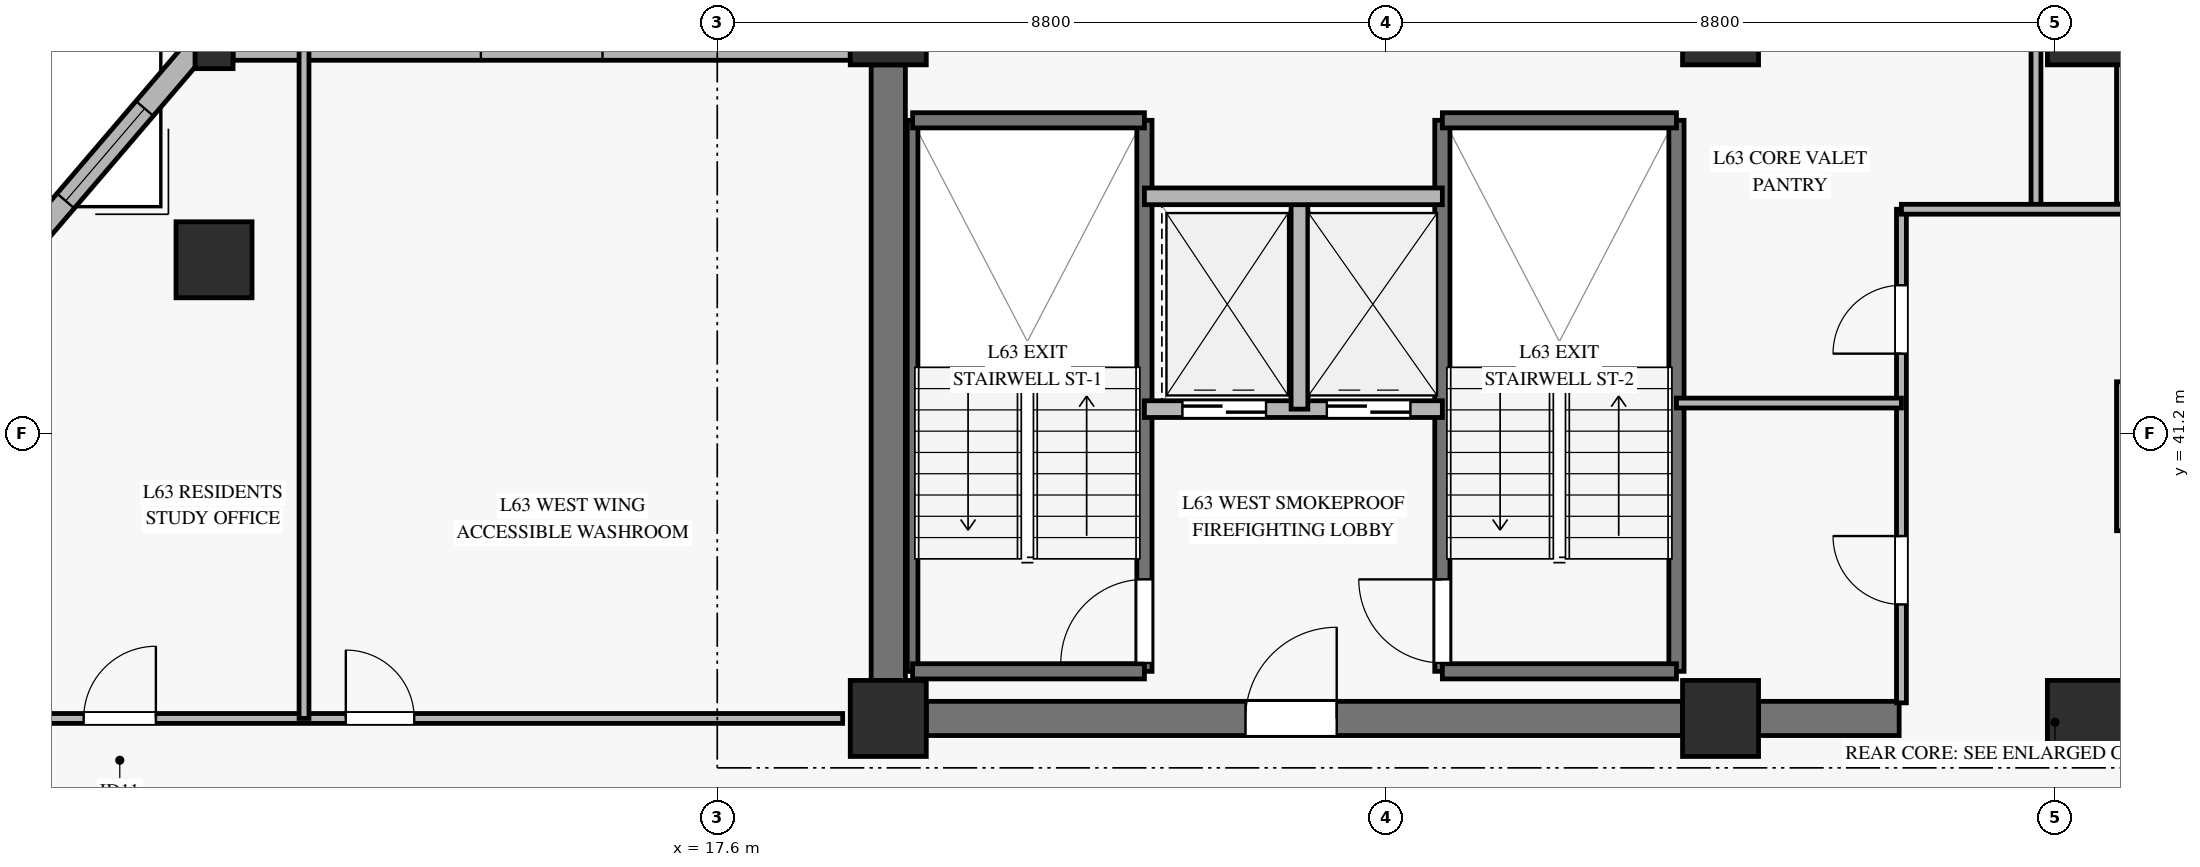
"""IFC4 building model, lengths in metres.
Left out: names, types, materials, properties, quantities, classifications, styles, units other than length and angle.
Written with IfcOpenShell. Run it as: python <this file> out.ifc"""

import sys

from ifc_helpers import new_model, si_unit, direction, frame, frame_2d, origin, origin_2d, place, context, subcontext, project, spatial, rectangle, hollow_rectangle, extrude, source, transform, mapped, element, fill, save


model = new_model("IFC4")
c1 = context("Model", 3, precision=1e-05, world=origin(), true_north=direction((0.0, 1.0)))
c2 = subcontext(c1, "Body", "Model", "MODEL_VIEW")
j1 = project(units=[si_unit("LENGTHUNIT", "METRE"), si_unit("PLANEANGLEUNIT", "RADIAN")], contexts=[c1])
p1 = place(None, origin())
s1 = spatial("IfcSite", under=j1, at=p1, CompositionType="ELEMENT")
p2 = place(p1, origin())
s2 = spatial("IfcBuilding", under=s1, at=p2, CompositionType="ELEMENT")
p3 = place(p2, frame((0.0, 0.0, 248.5)))
s3 = spatial("IfcBuildingStorey", under=s2, at=p3, CompositionType="ELEMENT", Elevation=248.5)
m1 = source(origin(), c2, "Body", "SweptSolid", [
    extrude(rectangle(XDim=1.0, YDim=1.0, at=origin_2d()), origin(), (0.0, 0.0, 1.0), 3.185),
])
for number, where, z_axis, x_axis in (
    (1, (19.85, 37.45, 0.0), (0.0, 0.0, 1.0), (1.0, 0.0, 0.0)),
    (2, (19.85, 46.55, 0.0), (0.0, 0.0, 1.0), (1.0, 0.0, 0.0)),
    (3, (30.8, 37.45, 0.0), (0.0, 0.0, 1.0), (1.0, 0.0, 0.0)),
    (4, (30.8, 46.55, 0.0), (0.0, 0.0, 1.0), (1.0, 0.0, 0.0)),
    (5, (35.6, 37.45, 0.0), (0.0, 0.0, 1.0), (1.0, 0.0, 0.0)),
    (6, (35.6, 46.55, 0.0), (0.0, 0.0, 1.0), (1.0, 0.0, 0.0)),
):
    element("IfcColumn", number, at=place(p3, frame(where, z_axis=z_axis, x_axis=x_axis)), inside=s3, PredefinedType="PILASTER", context=c2, shape_type="MappedRepresentation", body=[
        mapped(m1, transform((0.0, 0.0, 0.0), x_axis=(1.0, 0.0, 0.0), y_axis=(0.0, 1.0, 0.0), z_axis=(0.0, 0.0, 1.0), scale=1.0)),
    ])
p4 = place(p3, frame((20.35, 37.45, 0.0), z_axis=(0.0, 0.0, 1.0), x_axis=(1.0, 0.0, 0.0)))
e7 = element("IfcWall", 7, at=p4, inside=s3, PredefinedType="SHEAR", context=c2, shape_type="SweptSolid", body=[
    extrude(rectangle(XDim=9.95, YDim=0.45, at=frame_2d((4.975, 0.0))), origin(), (0.0, 0.0, 1.0), 3.185),
])
p5 = place(p4, frame((4.2, 0.0, 0.0)))
e8 = element("IfcOpeningElement", 8, at=p5, cuts=e7, PredefinedType="OPENING", context=c2, shape_type="SweptSolid", body=[
    extrude(rectangle(XDim=1.2, YDim=2.15, at=frame_2d((0.6, 1.075))), frame((0.0, 0.235, 0.0), z_axis=(0.0, -1.0, 0.0), x_axis=(1.0, 0.0, 0.0)), (0.0, 0.0, 1.0), 0.47),
])
p6 = place(p3, frame((31.3, 37.45, 0.0), z_axis=(0.0, 0.0, 1.0), x_axis=(1.0, 0.0, 0.0)))
e9 = element("IfcWall", 9, at=p6, inside=s3, PredefinedType="SHEAR", context=c2, shape_type="SweptSolid", body=[
    extrude(rectangle(XDim=1.85, YDim=0.45, at=frame_2d((0.925, 0.0))), origin(), (0.0, 0.0, 1.0), 3.185),
])
p7 = place(p3, frame((19.85, 37.95, 0.0), z_axis=(0.0, 0.0, 1.0), x_axis=(0.0, 1.0, 0.0)))
e10 = element("IfcWall", 10, at=p7, inside=s3, PredefinedType="SHEAR", context=c2, shape_type="SweptSolid", body=[
    extrude(rectangle(XDim=8.1, YDim=0.45, at=frame_2d((4.05, 0.0))), origin(), (0.0, 0.0, 1.0), 3.185),
])
m2 = source(origin(), c2, "Body", "SweptSolid", [
    extrude(hollow_rectangle(XDim=1.0, YDim=1.0, WallThickness=0.045, at=origin_2d()), origin(), (0.0, 0.0, 1.0), 3.185),
])
p8 = place(p3, frame((10.979, 43.485, 0.0), z_axis=(0.0, 0.0, 1.0), x_axis=(1.0, 0.0, 0.0)))
e11 = element("IfcColumn", 11, at=p8, inside=s3, PredefinedType="COLUMN", context=c2, shape_type="MappedRepresentation", body=[
    mapped(m2, transform((0.0, 0.0, 0.0), x_axis=(1.0, 0.0, 0.0), y_axis=(0.0, 1.0, 0.0), z_axis=(0.0, 0.0, 1.0), scale=1.0)),
])
m3 = source(origin(), c2, "Body", "SweptSolid", [
    extrude(hollow_rectangle(XDim=0.5, YDim=0.5, WallThickness=0.024, at=origin_2d()), origin(), (0.0, 0.0, 1.0), 3.185),
])
p9 = place(p3, frame((10.979, 46.25, 0.0), z_axis=(0.0, 0.0, 1.0), x_axis=(1.0, 0.0, 0.0)))
e12 = element("IfcColumn", 12, at=p9, inside=s3, PredefinedType="COLUMN", context=c2, shape_type="MappedRepresentation", body=[
    mapped(m3, transform((0.0, 0.0, 0.0), x_axis=(1.0, 0.0, 0.0), y_axis=(0.0, 1.0, 0.0), z_axis=(0.0, 0.0, 1.0), scale=1.0)),
])
p10 = place(p3, frame((11.229, 46.25, 0.0), z_axis=(0.0, 0.0, 1.0), x_axis=(1.0, 0.0, 0.0)))
e13 = element("IfcWall", 13, at=p10, inside=s3, PredefinedType="SOLIDWALL", context=c2, shape_type="SweptSolid", body=[
    extrude(rectangle(XDim=8.121, YDim=0.28, at=frame_2d((4.061, 0.0))), origin(), (0.0, 0.0, 1.0), 2.815),
])
p11 = place(p10, frame((3.261, 0.0, 0.45)))
e14 = element("IfcOpeningElement", 14, at=p11, cuts=e13, PredefinedType="OPENING", context=c2, shape_type="SweptSolid", body=[
    extrude(rectangle(XDim=1.6, YDim=2.0, at=frame_2d((0.8, 1.0))), frame((0.0, 0.15, 0.0), z_axis=(0.0, -1.0, 0.0), x_axis=(1.0, 0.0, 0.0)), (0.0, 0.0, 1.0), 0.3),
])
p12 = place(p3, frame((10.729, 46.25, 0.0), z_axis=(0.0, 0.0, 1.0), x_axis=(-0.65001186438, -0.759924059472, 0.0)))
e15 = element("IfcWall", 15, at=p12, inside=s3, PredefinedType="SOLIDWALL", context=c2, shape_type="SweptSolid", body=[
    extrude(rectangle(XDim=3.638, YDim=0.3, at=frame_2d((1.819, 0.0))), origin(), (0.0, 0.0, 1.0), 2.815),
])
p13 = place(p12, frame((1.019, 0.0, 0.45)))
e16 = element("IfcOpeningElement", 16, at=p13, cuts=e15, PredefinedType="OPENING", context=c2, shape_type="SweptSolid", body=[
    extrude(rectangle(XDim=1.6, YDim=2.0, at=frame_2d((0.8, 1.0))), frame((0.0, 0.16, 0.0), z_axis=(0.0, -1.0, 0.0), x_axis=(1.0, 0.0, 0.0)), (0.0, 0.0, 1.0), 0.32),
])
p14 = place(p3, frame((20.17, 38.07, 0.0), z_axis=(0.0, 0.0, 1.0), x_axis=(0.0, 1.0, 0.0)))
e17 = element("IfcWall", 17, at=p14, inside=s3, PredefinedType="SOLIDWALL", context=c2, shape_type="SweptSolid", body=[
    extrude(rectangle(XDim=7.25, YDim=0.14, at=frame_2d((3.625, 0.0))), origin(), (0.0, 0.0, 1.0), 3.4),
])
p15 = place(p3, frame((23.22, 38.07, 0.0), z_axis=(0.0, 0.0, 1.0), x_axis=(0.0, 1.0, 0.0)))
e18 = element("IfcWall", 18, at=p15, inside=s3, PredefinedType="SOLIDWALL", context=c2, shape_type="SweptSolid", body=[
    extrude(rectangle(XDim=7.25, YDim=0.2, at=frame_2d((3.625, 0.0))), origin(), (0.0, 0.0, 1.0), 3.4),
])
p16 = place(p15, frame((0.11, 0.0, 0.0)))
e19 = element("IfcOpeningElement", 19, at=p16, cuts=e18, PredefinedType="OPENING", context=c2, shape_type="SweptSolid", body=[
    extrude(rectangle(XDim=1.1, YDim=2.15, at=frame_2d((0.55, 1.075))), frame((0.0, 0.11, 0.0), z_axis=(0.0, -1.0, 0.0), x_axis=(1.0, 0.0, 0.0)), (0.0, 0.0, 1.0), 0.22),
])
for number, where, z_axis, x_axis in (
    (20, (20.17, 45.32, 0.0), (0.0, 0.0, 1.0), (1.0, 0.0, 0.0)),
    (21, (20.17, 38.07, 0.0), (0.0, 0.0, 1.0), (1.0, 0.0, 0.0)),
):
    element("IfcWall", number, at=place(p3, frame(where, z_axis=z_axis, x_axis=x_axis)), inside=s3, PredefinedType="SOLIDWALL", context=c2, shape_type="SweptSolid", body=[
        extrude(rectangle(XDim=3.05, YDim=0.2, at=frame_2d((1.525, 0.0))), origin(), (0.0, 0.0, 1.0), 3.4),
    ])
p17 = place(p3, frame((27.14, 38.07, 0.0), z_axis=(0.0, 0.0, 1.0), x_axis=(0.0, 1.0, 0.0)))
e22 = element("IfcWall", 22, at=p17, inside=s3, PredefinedType="SOLIDWALL", context=c2, shape_type="SweptSolid", body=[
    extrude(rectangle(XDim=7.25, YDim=0.2, at=frame_2d((3.625, 0.0))), origin(), (0.0, 0.0, 1.0), 3.4),
])
p18 = place(p17, frame((0.11, 0.0, 0.0)))
e23 = element("IfcOpeningElement", 23, at=p18, cuts=e22, PredefinedType="OPENING", context=c2, shape_type="SweptSolid", body=[
    extrude(rectangle(XDim=1.1, YDim=2.15, at=frame_2d((0.55, 1.075))), frame((0.0, 0.11, 0.0), z_axis=(0.0, -1.0, 0.0), x_axis=(1.0, 0.0, 0.0)), (0.0, 0.0, 1.0), 0.22),
])
p19 = place(p3, frame((30.22, 38.07, 0.0), z_axis=(0.0, 0.0, 1.0), x_axis=(0.0, 1.0, 0.0)))
e24 = element("IfcWall", 24, at=p19, inside=s3, PredefinedType="SOLIDWALL", context=c2, shape_type="SweptSolid", body=[
    extrude(rectangle(XDim=7.25, YDim=0.2, at=frame_2d((3.625, 0.0))), origin(), (0.0, 0.0, 1.0), 3.4),
])
for number, where, z_axis, x_axis in (
    (25, (27.14, 45.32, 0.0), (0.0, 0.0, 1.0), (1.0, 0.0, 0.0)),
    (26, (27.14, 38.07, 0.0), (0.0, 0.0, 1.0), (1.0, 0.0, 0.0)),
):
    element("IfcWall", number, at=place(p3, frame(where, z_axis=z_axis, x_axis=x_axis)), inside=s3, PredefinedType="SOLIDWALL", context=c2, shape_type="SweptSolid", body=[
        extrude(rectangle(XDim=3.08, YDim=0.2, at=frame_2d((1.54, 0.0))), origin(), (0.0, 0.0, 1.0), 3.4),
    ])
p20 = place(p3, frame((23.22, 41.52, 0.0), z_axis=(0.0, 0.0, 1.0), x_axis=(1.0, 0.0, 0.0)))
e27 = element("IfcWall", 27, at=p20, inside=s3, PredefinedType="SOLIDWALL", context=c2, shape_type="SweptSolid", body=[
    extrude(rectangle(XDim=3.92, YDim=0.22, at=frame_2d((1.96, 0.0))), origin(), (0.0, 0.0, 1.0), 3.185),
])
p21 = place(p20, frame((0.5, 0.0, 0.0)))
e28 = element("IfcOpeningElement", 28, at=p21, cuts=e27, PredefinedType="OPENING", context=c2, shape_type="SweptSolid", body=[
    extrude(rectangle(XDim=1.1, YDim=2.2, at=frame_2d((0.55, 1.1))), frame((0.0, 0.12, 0.0), z_axis=(0.0, -1.0, 0.0), x_axis=(1.0, 0.0, 0.0)), (0.0, 0.0, 1.0), 0.24),
])
p22 = place(p20, frame((2.4, 0.0, 0.0)))
e29 = element("IfcOpeningElement", 29, at=p22, cuts=e27, PredefinedType="OPENING", context=c2, shape_type="SweptSolid", body=[
    extrude(rectangle(XDim=1.1, YDim=2.2, at=frame_2d((0.55, 1.1))), frame((0.0, 0.12, 0.0), z_axis=(0.0, -1.0, 0.0), x_axis=(1.0, 0.0, 0.0)), (0.0, 0.0, 1.0), 0.24),
])
p23 = place(p3, frame((25.26, 41.52, 0.0), z_axis=(0.0, 0.0, 1.0), x_axis=(0.0, 1.0, 0.0)))
e30 = element("IfcWall", 30, at=p23, inside=s3, PredefinedType="SOLIDWALL", context=c2, shape_type="SweptSolid", body=[
    extrude(rectangle(XDim=2.8, YDim=0.22, at=frame_2d((1.4, 0.0))), origin(), (0.0, 0.0, 1.0), 3.185),
])
p24 = place(p3, frame((23.22, 44.32, 0.0), z_axis=(0.0, 0.0, 1.0), x_axis=(1.0, 0.0, 0.0)))
e31 = element("IfcWall", 31, at=p24, inside=s3, PredefinedType="SOLIDWALL", context=c2, shape_type="SweptSolid", body=[
    extrude(rectangle(XDim=3.92, YDim=0.22, at=frame_2d((1.96, 0.0))), origin(), (0.0, 0.0, 1.0), 3.185),
])
p25 = place(p3, frame((36.12, 39.92, 0.0), z_axis=(0.0, 0.0, 1.0), x_axis=(0.0, 1.0, 0.0)))
e32 = element("IfcWall", 32, at=p25, inside=s3, PredefinedType="SOLIDWALL", context=c2, shape_type="SweptSolid", body=[
    extrude(rectangle(XDim=1.96, YDim=0.22, at=frame_2d((0.98, 0.0))), origin(), (0.0, 0.0, 1.0), 3.185),
])
p26 = place(p3, frame((36.12, 44.22, 0.0), z_axis=(0.0, 0.0, 1.0), x_axis=(0.0, 1.0, 0.0)))
e33 = element("IfcWall", 33, at=p26, inside=s3, PredefinedType="SOLIDWALL", context=c2, shape_type="SweptSolid", body=[
    extrude(rectangle(XDim=2.125, YDim=0.22, at=frame_2d((1.062, 0.0))), origin(), (0.0, 0.0, 1.0), 3.185),
])
p27 = place(p3, frame((33.18, 37.655, 0.0), z_axis=(0.0, 0.0, 1.0), x_axis=(0.0, 1.0, 0.0)))
e34 = element("IfcWall", 34, at=p27, inside=s3, PredefinedType="PARTITIONING", context=c2, shape_type="SweptSolid", body=[
    extrude(rectangle(XDim=6.495, YDim=0.13, at=frame_2d((3.248, 0.0))), origin(), (0.0, 0.0, 1.0), 2.27),
])
p28 = place(p27, frame((1.295, 0.0, 0.0)))
e35 = element("IfcOpeningElement", 35, at=p28, cuts=e34, PredefinedType="OPENING", context=c2, shape_type="SweptSolid", body=[
    extrude(rectangle(XDim=0.9, YDim=2.1, at=frame_2d((0.45, 1.05))), frame((0.0, 0.075, 0.0), z_axis=(0.0, -1.0, 0.0), x_axis=(1.0, 0.0, 0.0)), (0.0, 0.0, 1.0), 0.15),
])
p29 = place(p27, frame((4.595, 0.0, 0.0)))
e36 = element("IfcOpeningElement", 36, at=p29, cuts=e34, PredefinedType="OPENING", context=c2, shape_type="SweptSolid", body=[
    extrude(rectangle(XDim=0.9, YDim=2.1, at=frame_2d((0.45, 1.05))), frame((0.0, 0.075, 0.0), z_axis=(0.0, -1.0, 0.0), x_axis=(1.0, 0.0, 0.0)), (0.0, 0.0, 1.0), 0.15),
])
p30 = place(p3, frame((34.95, 44.15, 0.0), z_axis=(0.0, 0.0, 1.0), x_axis=(0.0, 1.0, 0.0)))
e37 = element("IfcWall", 37, at=p30, inside=s3, PredefinedType="PARTITIONING", context=c2, shape_type="SweptSolid", body=[
    extrude(rectangle(XDim=2.195, YDim=0.13, at=frame_2d((1.098, 0.0))), origin(), (0.0, 0.0, 1.0), 3.185),
])
p31 = place(p3, frame((33.18, 44.15, 0.0), z_axis=(0.0, 0.0, 1.0), x_axis=(1.0, 0.0, 0.0)))
e38 = element("IfcWall", 38, at=p31, inside=s3, PredefinedType="PARTITIONING", context=c2, shape_type="SweptSolid", body=[
    extrude(rectangle(XDim=2.94, YDim=0.13, at=frame_2d((1.47, 0.0))), origin(), (0.0, 0.0, 1.0), 2.47),
])
p32 = place(p3, frame((30.22, 41.6, 0.0), z_axis=(0.0, 0.0, 1.0), x_axis=(1.0, 0.0, 0.0)))
e39 = element("IfcWall", 39, at=p32, inside=s3, PredefinedType="PARTITIONING", context=c2, shape_type="SweptSolid", body=[
    extrude(rectangle(XDim=2.96, YDim=0.13, at=frame_2d((1.48, 0.0))), origin(), (0.0, 0.0, 1.0), 2.47),
])
p33 = place(p3, frame((8.364, 37.45, 0.0), z_axis=(0.0, 0.0, 1.0), x_axis=(1.0, 0.0, 0.0)))
e40 = element("IfcWall", 40, at=p33, inside=s3, PredefinedType="PARTITIONING", context=c2, shape_type="SweptSolid", body=[
    extrude(rectangle(XDim=10.886, YDim=0.13, at=frame_2d((5.443, 0.0))), origin(), (0.0, 0.0, 1.0), 2.82),
])
p34 = place(p33, frame((0.9, 0.0, 0.0)))
e41 = element("IfcOpeningElement", 41, at=p34, cuts=e40, PredefinedType="OPENING", context=c2, shape_type="SweptSolid", body=[
    extrude(rectangle(XDim=0.95, YDim=2.1, at=frame_2d((0.475, 1.05))), frame((0.0, 0.075, 0.0), z_axis=(0.0, -1.0, 0.0), x_axis=(1.0, 0.0, 0.0)), (0.0, 0.0, 1.0), 0.15),
])
p35 = place(p33, frame((4.349, 0.0, 0.0)))
e42 = element("IfcOpeningElement", 42, at=p35, cuts=e40, PredefinedType="OPENING", context=c2, shape_type="SweptSolid", body=[
    extrude(rectangle(XDim=0.9, YDim=2.1, at=frame_2d((0.45, 1.05))), frame((0.0, 0.075, 0.0), z_axis=(0.0, -1.0, 0.0), x_axis=(1.0, 0.0, 0.0)), (0.0, 0.0, 1.0), 0.15),
])
p36 = place(p3, frame((12.163, 37.45, 0.0), z_axis=(0.0, 0.0, 1.0), x_axis=(0.0, 1.0, 0.0)))
e43 = element("IfcWall", 43, at=p36, inside=s3, PredefinedType="PARTITIONING", context=c2, shape_type="SweptSolid", body=[
    extrude(rectangle(XDim=8.8, YDim=0.13, at=frame_2d((4.4, 0.0))), origin(), (0.0, 0.0, 1.0), 3.185),
])
m4 = source(origin(), c2, "Body", "SweptSolid", [
    extrude(rectangle(XDim=1.6, YDim=2.0, at=frame_2d((0.8, 1.0))), frame((0.0, 0.03, 0.0), z_axis=(0.0, -1.0, 0.0), x_axis=(1.0, 0.0, 0.0)), (0.0, 0.0, 1.0), 0.06),
])
p37 = place(p13, origin())
e44 = element("IfcWindow", 44, at=p37, inside=s3, PartitioningType="SINGLE_PANEL", PredefinedType="WINDOW", context=c2, shape_type="MappedRepresentation", body=[
    mapped(m4, transform((0.0, 0.0, 0.0), x_axis=(1.0, 0.0, 0.0), y_axis=(0.0, 1.0, 0.0), z_axis=(0.0, 0.0, 1.0), scale=1.0)),
])
fill(e16, e44)
m5 = source(origin(), c2, "Body", "SweptSolid", [
    extrude(rectangle(XDim=1.1, YDim=2.15, at=frame_2d((0.55, 1.075))), frame((0.0, 0.025, 0.0), z_axis=(0.0, -1.0, 0.0), x_axis=(1.0, 0.0, 0.0)), (0.0, 0.0, 1.0), 0.05),
])
p38 = place(p16, origin())
e45 = element("IfcDoor", 45, at=p38, inside=s3, OperationType="SINGLE_SWING_LEFT", PredefinedType="DOOR", context=c2, shape_type="MappedRepresentation", body=[
    mapped(m5, transform((0.0, 0.0, 0.0), x_axis=(1.0, 0.0, 0.0), y_axis=(0.0, 1.0, 0.0), z_axis=(0.0, 0.0, 1.0), scale=1.0)),
])
fill(e19, e45)
p39 = place(p18, origin())
e46 = element("IfcDoor", 46, at=p39, inside=s3, OperationType="SINGLE_SWING_RIGHT", PredefinedType="DOOR", context=c2, shape_type="MappedRepresentation", body=[
    mapped(m5, transform((0.0, 0.0, 0.0), x_axis=(1.0, 0.0, 0.0), y_axis=(0.0, 1.0, 0.0), z_axis=(0.0, 0.0, 1.0), scale=1.0)),
])
fill(e23, e46)
m6 = source(origin(), c2, "Body", "SweptSolid", [
    extrude(rectangle(XDim=1.1, YDim=2.2, at=frame_2d((0.55, 1.1))), frame((0.0, 0.025, 0.0), z_axis=(0.0, -1.0, 0.0), x_axis=(1.0, 0.0, 0.0)), (0.0, 0.0, 1.0), 0.05),
])
p40 = place(p21, origin())
e47 = element("IfcDoor", 47, at=p40, inside=s3, OperationType="SLIDING_TO_LEFT", PredefinedType="DOOR", context=c2, shape_type="MappedRepresentation", body=[
    mapped(m6, transform((0.0, 0.0, 0.0), x_axis=(1.0, 0.0, 0.0), y_axis=(0.0, 1.0, 0.0), z_axis=(0.0, 0.0, 1.0), scale=1.0)),
])
fill(e28, e47)
p41 = place(p22, origin())
e48 = element("IfcDoor", 48, at=p41, inside=s3, OperationType="SLIDING_TO_LEFT", PredefinedType="DOOR", context=c2, shape_type="MappedRepresentation", body=[
    mapped(m6, transform((0.0, 0.0, 0.0), x_axis=(1.0, 0.0, 0.0), y_axis=(0.0, 1.0, 0.0), z_axis=(0.0, 0.0, 1.0), scale=1.0)),
])
fill(e29, e48)
m7 = source(origin(), c2, "Body", "SweptSolid", [
    extrude(rectangle(XDim=1.2, YDim=2.15, at=frame_2d((0.6, 1.075))), frame((0.0, 0.025, 0.0), z_axis=(0.0, -1.0, 0.0), x_axis=(1.0, 0.0, 0.0)), (0.0, 0.0, 1.0), 0.05),
])
p42 = place(p5, origin())
e49 = element("IfcDoor", 49, at=p42, inside=s3, OperationType="SINGLE_SWING_RIGHT", PredefinedType="DOOR", context=c2, shape_type="MappedRepresentation", body=[
    mapped(m7, transform((0.0, 0.0, 0.0), x_axis=(1.0, 0.0, 0.0), y_axis=(0.0, 1.0, 0.0), z_axis=(0.0, 0.0, 1.0), scale=1.0)),
])
fill(e8, e49)
m8 = source(origin(), c2, "Body", "SweptSolid", [
    extrude(rectangle(XDim=0.9, YDim=2.1, at=frame_2d((0.45, 1.05))), frame((0.0, 0.025, 0.0), z_axis=(0.0, -1.0, 0.0), x_axis=(1.0, 0.0, 0.0)), (0.0, 0.0, 1.0), 0.05),
])
p43 = place(p28, origin())
e50 = element("IfcDoor", 50, at=p43, inside=s3, OperationType="SINGLE_SWING_RIGHT", PredefinedType="DOOR", context=c2, shape_type="MappedRepresentation", body=[
    mapped(m8, transform((0.0, 0.0, 0.0), x_axis=(1.0, 0.0, 0.0), y_axis=(0.0, 1.0, 0.0), z_axis=(0.0, 0.0, 1.0), scale=1.0)),
])
fill(e35, e50)
p44 = place(p29, origin())
e51 = element("IfcDoor", 51, at=p44, inside=s3, OperationType="SINGLE_SWING_LEFT", PredefinedType="DOOR", context=c2, shape_type="MappedRepresentation", body=[
    mapped(m8, transform((0.0, 0.0, 0.0), x_axis=(1.0, 0.0, 0.0), y_axis=(0.0, 1.0, 0.0), z_axis=(0.0, 0.0, 1.0), scale=1.0)),
])
fill(e36, e51)
m9 = source(origin(), c2, "Body", "SweptSolid", [
    extrude(rectangle(XDim=0.95, YDim=2.1, at=frame_2d((0.475, 1.05))), frame((0.0, 0.025, 0.0), z_axis=(0.0, -1.0, 0.0), x_axis=(1.0, 0.0, 0.0)), (0.0, 0.0, 1.0), 0.05),
])
p45 = place(p34, origin())
e52 = element("IfcDoor", 52, at=p45, inside=s3, OperationType="SINGLE_SWING_RIGHT", PredefinedType="DOOR", context=c2, shape_type="MappedRepresentation", body=[
    mapped(m9, transform((0.0, 0.0, 0.0), x_axis=(1.0, 0.0, 0.0), y_axis=(0.0, 1.0, 0.0), z_axis=(0.0, 0.0, 1.0), scale=1.0)),
])
fill(e41, e52)
p46 = place(p35, origin())
e53 = element("IfcDoor", 53, at=p46, inside=s3, OperationType="SINGLE_SWING_LEFT", PredefinedType="DOOR", context=c2, shape_type="MappedRepresentation", body=[
    mapped(m8, transform((0.0, 0.0, 0.0), x_axis=(1.0, 0.0, 0.0), y_axis=(0.0, 1.0, 0.0), z_axis=(0.0, 0.0, 1.0), scale=1.0)),
])
fill(e42, e53)
save(model, sys.argv[1])
